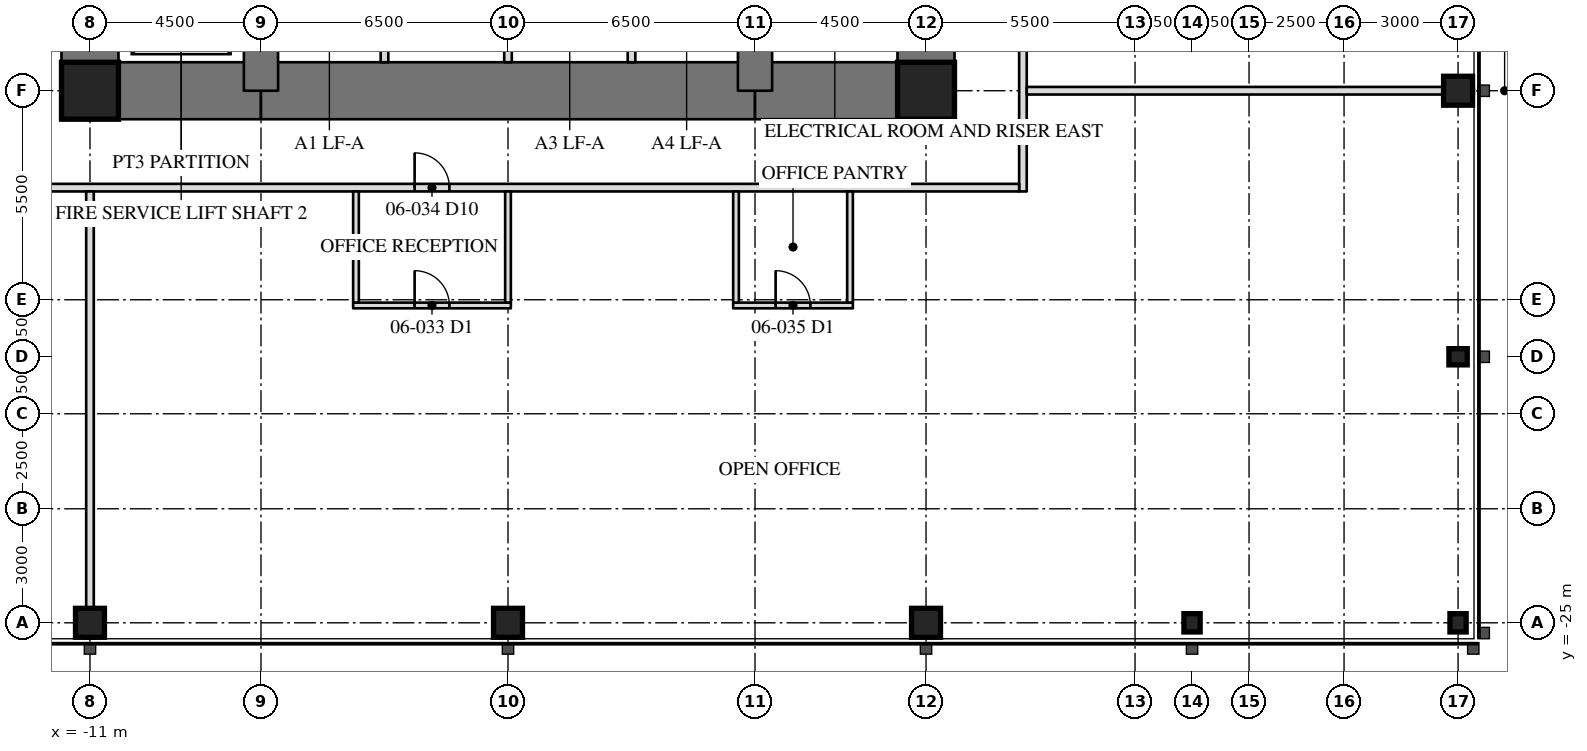
"""IFC4 building model, lengths in metres.
Left out: names, types, materials, properties, quantities, classifications, styles, units other than length and angle.
Written with IfcOpenShell. Run it as: python <this file> out.ifc"""

import sys

from ifc_helpers import new_model, si_unit, direction, frame, frame_2d, origin, origin_2d, place, context, subcontext, project, spatial, rectangle, hollow_rectangle, i_section, extrude, element, fill, save


model = new_model("IFC4")
c1 = context("Model", 3, precision=1e-05, world=origin(), true_north=direction((0.0, 1.0)))
c2 = subcontext(c1, "Body", "Model", "MODEL_VIEW")
j1 = project(units=[si_unit("LENGTHUNIT", "METRE"), si_unit("PLANEANGLEUNIT", "RADIAN")], contexts=[c1])
p1 = place(None, origin())
s1 = spatial("IfcSite", under=j1, at=p1, CompositionType="ELEMENT")
p2 = place(p1, origin())
s2 = spatial("IfcBuilding", under=s1, at=p2, CompositionType="ELEMENT")
p3 = place(p2, frame((0.0, 0.0, 28.3)))
s3 = spatial("IfcBuildingStorey", under=s2, at=p3, CompositionType="ELEMENT", Elevation=28.3)
for number, where, z_axis, x_axis in (
    (1, (-11.0, -25.0, 0.0), (0.0, 0.0, 1.0), (1.0, 0.0, 0.0)),
    (2, (0.0, -25.0, 0.0), (0.0, 0.0, 1.0), (1.0, 0.0, 0.0)),
    (3, (11.0, -25.0, 0.0), (0.0, 0.0, 1.0), (1.0, 0.0, 0.0)),
):
    element("IfcColumn", number, at=place(p3, frame(where, z_axis=z_axis, x_axis=x_axis)), inside=s3, PredefinedType="COLUMN", context=c2, shape_type="SweptSolid", body=[
        extrude(hollow_rectangle(XDim=0.762, YDim=0.762, WallThickness=0.127, at=origin_2d()), origin(), (0.0, 0.0, 1.0), 4.1),
    ])
for number, where, z_axis, x_axis in (
    (4, (18.0, -25.0, 0.0), (0.0, 0.0, 1.0), (1.0, 0.0, 0.0)),
    (5, (25.0, -25.0, 0.0), (0.0, 0.0, 1.0), (1.0, 0.0, 0.0)),
    (6, (25.0, -18.0, 0.0), (0.0, 0.0, 1.0), (0.0, 1.0, 0.0)),
):
    element("IfcColumn", number, at=place(p3, frame(where, z_axis=z_axis, x_axis=x_axis)), inside=s3, PredefinedType="COLUMN", context=c2, shape_type="SweptSolid", body=[
        extrude(i_section(OverallWidth=0.427, OverallDepth=0.483, WebThickness=0.051, FlangeThickness=0.082, at=origin_2d()), origin(), (0.0, 0.0, 1.0), 4.1),
    ])
p4 = place(p3, frame((25.0, -11.0, 0.0), z_axis=(0.0, 0.0, 1.0), x_axis=(0.0, 1.0, 0.0)))
e7 = element("IfcColumn", 7, at=p4, inside=s3, PredefinedType="COLUMN", context=c2, shape_type="SweptSolid", body=[
    extrude(hollow_rectangle(XDim=0.762, YDim=0.762, WallThickness=0.127, at=origin_2d()), origin(), (0.0, 0.0, 1.0), 4.1),
])
p5 = place(p3, frame((11.0, -11.0, 0.0), z_axis=(0.0, 0.0, 1.0), x_axis=(0.0, 1.0, 0.0)))
e8 = element("IfcWall", 8, at=p5, inside=s3, PredefinedType="SHEAR", context=c2, shape_type="SweptSolid", body=[
    extrude(rectangle(XDim=22.0, YDim=1.5, at=frame_2d((11.0, 0.0))), origin(), (0.0, 0.0, 1.0), 4.1),
])
p6 = place(p5, frame((15.393, 0.0, 0.0)))
e9 = element("IfcOpeningElement", 9, at=p6, cuts=e8, PredefinedType="OPENING", context=c2, shape_type="SweptSolid", body=[
    extrude(rectangle(XDim=0.915, YDim=2.134, at=frame_2d((0.458, 1.067))), frame((0.0, 0.76, 0.0), z_axis=(0.0, -1.0, 0.0), x_axis=(1.0, 0.0, 0.0)), (0.0, 0.0, 1.0), 1.52),
])
p7 = place(p3, frame((-11.0, 11.0, 0.0), z_axis=(0.0, 0.0, 1.0), x_axis=(0.0, -1.0, 0.0)))
e10 = element("IfcWall", 10, at=p7, inside=s3, PredefinedType="SHEAR", context=c2, shape_type="SweptSolid", body=[
    extrude(rectangle(XDim=22.0, YDim=1.5, at=frame_2d((11.0, 0.0))), origin(), (0.0, 0.0, 1.0), 4.1),
])
p8 = place(p7, frame((15.393, 0.0, 0.0)))
e11 = element("IfcOpeningElement", 11, at=p8, cuts=e10, PredefinedType="OPENING", context=c2, shape_type="SweptSolid", body=[
    extrude(rectangle(XDim=0.915, YDim=2.134, at=frame_2d((0.458, 1.067))), frame((0.0, 0.76, 0.0), z_axis=(0.0, -1.0, 0.0), x_axis=(1.0, 0.0, 0.0)), (0.0, 0.0, 1.0), 1.52),
])
p9 = place(p3, frame((-11.0, -11.0, 0.0), z_axis=(0.0, 0.0, 1.0), x_axis=(1.0, 0.0, 0.0)))
e12 = element("IfcWall", 12, at=p9, inside=s3, PredefinedType="SHEAR", context=c2, shape_type="SweptSolid", body=[
    extrude(rectangle(XDim=4.5, YDim=1.5, at=frame_2d((2.25, 0.0))), origin(), (0.0, 0.0, 1.0), 4.1),
])
p10 = place(p3, frame((-6.5, -11.0, 0.0), z_axis=(0.0, 0.0, 1.0), x_axis=(1.0, 0.0, 0.0)))
e13 = element("IfcWall", 13, at=p10, inside=s3, PredefinedType="SHEAR", context=c2, shape_type="SweptSolid", body=[
    extrude(rectangle(XDim=13.0, YDim=1.5, at=frame_2d((6.5, 0.0))), origin(), (0.0, 0.0, 1.0), 4.1),
])
p11 = place(p3, frame((6.5, -11.0, 0.0), z_axis=(0.0, 0.0, 1.0), x_axis=(1.0, 0.0, 0.0)))
e14 = element("IfcWall", 14, at=p11, inside=s3, PredefinedType="SHEAR", context=c2, shape_type="SweptSolid", body=[
    extrude(rectangle(XDim=4.5, YDim=1.5, at=frame_2d((2.25, 0.0))), origin(), (0.0, 0.0, 1.0), 4.1),
])
for number, where, z_axis, x_axis in (
    (15, (6.5, -11.0, 0.0), (0.0, 0.0, 1.0), (0.0, 1.0, 0.0)),
    (16, (-6.5, -6.5, 0.0), (0.0, 0.0, 1.0), (0.0, -1.0, 0.0)),
):
    element("IfcWall", number, at=place(p3, frame(where, z_axis=z_axis, x_axis=x_axis)), inside=s3, PredefinedType="SHEAR", context=c2, shape_type="SweptSolid", body=[
        extrude(rectangle(XDim=4.5, YDim=0.9, at=frame_2d((2.25, 0.0))), origin(), (0.0, 0.0, 1.0), 4.1),
    ])
for number, where, z_axis, x_axis in (
    (17, (-11.0, -11.0, 0.0), (0.0, 0.0, 1.0), (1.0, 0.0, 0.0)),
    (18, (11.0, -11.0, 0.0), (0.0, 0.0, 1.0), (1.0, 0.0, 0.0)),
):
    element("IfcColumn", number, at=place(p3, frame(where, z_axis=z_axis, x_axis=x_axis)), inside=s3, PredefinedType="COLUMN", context=c2, shape_type="SweptSolid", body=[
        extrude(hollow_rectangle(XDim=1.499, YDim=1.499, WallThickness=0.102, at=origin_2d()), origin(), (0.0, 0.0, 1.0), 4.1),
    ])
for number, where, z_axis, x_axis in (
    (19, (-3.25, -10.25, 0.0), (0.0, 0.0, 1.0), (0.0, 1.0, 0.0)),
    (20, (0.0, -10.25, 0.0), (0.0, 0.0, 1.0), (0.0, 1.0, 0.0)),
    (21, (3.25, -10.25, 0.0), (0.0, 0.0, 1.0), (0.0, 1.0, 0.0)),
):
    element("IfcWall", number, at=place(p3, frame(where, z_axis=z_axis, x_axis=x_axis)), inside=s3, PredefinedType="PARTITIONING", context=c2, shape_type="SweptSolid", body=[
        extrude(rectangle(XDim=3.3, YDim=0.2, at=frame_2d((1.65, 0.0))), origin(), (0.0, 0.0, 1.0), 3.91),
    ])
p12 = place(p3, frame((13.55, -13.65, 0.0), z_axis=(0.0, 0.0, 1.0), x_axis=(0.0, 1.0, 0.0)))
e22 = element("IfcWall", 22, at=p12, inside=s3, PredefinedType="PARTITIONING", context=c2, shape_type="SweptSolid", body=[
    extrude(rectangle(XDim=27.1, YDim=0.2, at=frame_2d((13.55, 0.0))), origin(), (0.0, 0.0, 1.0), 3.91),
])
p13 = place(p12, frame((7.192, 0.0, 0.0)))
e23 = element("IfcOpeningElement", 23, at=p13, cuts=e22, PredefinedType="OPENING", context=c2, shape_type="SweptSolid", body=[
    extrude(rectangle(XDim=0.915, YDim=2.134, at=frame_2d((0.458, 1.067))), frame((0.0, 0.11, 0.0), z_axis=(0.0, -1.0, 0.0), x_axis=(1.0, 0.0, 0.0)), (0.0, 0.0, 1.0), 0.22),
])
p14 = place(p3, frame((-13.65, -13.55, 0.0), z_axis=(0.0, 0.0, 1.0), x_axis=(1.0, 0.0, 0.0)))
e24 = element("IfcWall", 24, at=p14, inside=s3, PredefinedType="PARTITIONING", context=c2, shape_type="SweptSolid", body=[
    extrude(rectangle(XDim=27.1, YDim=0.2, at=frame_2d((13.55, 0.0))), origin(), (0.0, 0.0, 1.0), 3.91),
])
p15 = place(p14, frame((11.192, 0.0, 0.0)))
e25 = element("IfcOpeningElement", 25, at=p15, cuts=e24, PredefinedType="OPENING", context=c2, shape_type="SweptSolid", body=[
    extrude(rectangle(XDim=0.915, YDim=2.134, at=frame_2d((0.458, 1.067))), frame((0.0, 0.11, 0.0), z_axis=(0.0, -1.0, 0.0), x_axis=(1.0, 0.0, 0.0)), (0.0, 0.0, 1.0), 0.22),
])
for number, where, z_axis, x_axis in (
    (26, (-11.0, -13.65, 0.0), (0.0, 0.0, 1.0), (0.0, -1.0, 0.0)),
    (27, (13.65, -11.0, 0.0), (0.0, 0.0, 1.0), (1.0, 0.0, 0.0)),
):
    element("IfcWall", number, at=place(p3, frame(where, z_axis=z_axis, x_axis=x_axis)), inside=s3, PredefinedType="PARTITIONING", context=c2, shape_type="SweptSolid", body=[
        extrude(rectangle(XDim=11.765, YDim=0.2, at=frame_2d((5.883, 0.0))), origin(), (0.0, 0.0, 1.0), 3.13),
    ])
p16 = place(p3, frame((-4.075, -16.65, 0.0), z_axis=(0.0, 0.0, 1.0), x_axis=(1.0, 0.0, 0.0)))
e28 = element("IfcWall", 28, at=p16, inside=s3, PredefinedType="PARTITIONING", context=c2, shape_type="SweptSolid", body=[
    extrude(rectangle(XDim=4.15, YDim=0.15, at=frame_2d((2.075, 0.0))), origin(), (0.0, 0.0, 1.0), 3.91),
])
p17 = place(p16, frame((1.617, 0.0, 0.0)))
e29 = element("IfcOpeningElement", 29, at=p17, cuts=e28, PredefinedType="OPENING", context=c2, shape_type="SweptSolid", body=[
    extrude(rectangle(XDim=0.915, YDim=2.134, at=frame_2d((0.458, 1.067))), frame((0.0, 0.085, 0.0), z_axis=(0.0, -1.0, 0.0), x_axis=(1.0, 0.0, 0.0)), (0.0, 0.0, 1.0), 0.17),
])
p18 = place(p3, frame((-4.0, -16.575, 0.0), z_axis=(0.0, 0.0, 1.0), x_axis=(0.0, 1.0, 0.0)))
e30 = element("IfcWall", 30, at=p18, inside=s3, PredefinedType="PARTITIONING", context=c2, shape_type="SweptSolid", body=[
    extrude(rectangle(XDim=2.925, YDim=0.15, at=frame_2d((1.462, 0.0))), origin(), (0.0, 0.0, 1.0), 3.91),
])
p19 = place(p3, frame((0.0, -16.575, 0.0), z_axis=(0.0, 0.0, 1.0), x_axis=(0.0, 1.0, 0.0)))
e31 = element("IfcWall", 31, at=p19, inside=s3, PredefinedType="PARTITIONING", context=c2, shape_type="SweptSolid", body=[
    extrude(rectangle(XDim=2.925, YDim=0.15, at=frame_2d((1.462, 0.0))), origin(), (0.0, 0.0, 1.0), 3.13),
])
p20 = place(p3, frame((5.925, -16.65, 0.0), z_axis=(0.0, 0.0, 1.0), x_axis=(1.0, 0.0, 0.0)))
e32 = element("IfcWall", 32, at=p20, inside=s3, PredefinedType="PARTITIONING", context=c2, shape_type="SweptSolid", body=[
    extrude(rectangle(XDim=3.15, YDim=0.15, at=frame_2d((1.575, 0.0))), origin(), (0.0, 0.0, 1.0), 3.91),
])
p21 = place(p20, frame((1.117, 0.0, 0.0)))
e33 = element("IfcOpeningElement", 33, at=p21, cuts=e32, PredefinedType="OPENING", context=c2, shape_type="SweptSolid", body=[
    extrude(rectangle(XDim=0.915, YDim=2.134, at=frame_2d((0.458, 1.067))), frame((0.0, 0.085, 0.0), z_axis=(0.0, -1.0, 0.0), x_axis=(1.0, 0.0, 0.0)), (0.0, 0.0, 1.0), 0.17),
])
for number, where, z_axis, x_axis in (
    (34, (6.0, -16.575, 0.0), (0.0, 0.0, 1.0), (0.0, 1.0, 0.0)),
    (35, (9.0, -16.575, 0.0), (0.0, 0.0, 1.0), (0.0, 1.0, 0.0)),
):
    element("IfcWall", number, at=place(p3, frame(where, z_axis=z_axis, x_axis=x_axis)), inside=s3, PredefinedType="PARTITIONING", context=c2, shape_type="SweptSolid", body=[
        extrude(rectangle(XDim=2.925, YDim=0.15, at=frame_2d((1.462, 0.0))), origin(), (0.0, 0.0, 1.0), 3.91),
    ])
p22 = place(p17, origin())
e36 = element("IfcDoor", 36, at=p22, inside=s3, OperationType="SINGLE_SWING_LEFT", PredefinedType="DOOR", context=c2, shape_type="SweptSolid", body=[
    extrude(rectangle(XDim=0.915, YDim=2.134, at=frame_2d((0.458, 1.067))), frame((0.0, 0.025, 0.0), z_axis=(0.0, -1.0, 0.0), x_axis=(1.0, 0.0, 0.0)), (0.0, 0.0, 1.0), 0.05),
])
fill(e29, e36)
p23 = place(p15, origin())
e37 = element("IfcDoor", 37, at=p23, inside=s3, OperationType="SINGLE_SWING_LEFT", PredefinedType="DOOR", context=c2, shape_type="SweptSolid", body=[
    extrude(rectangle(XDim=0.915, YDim=2.134, at=frame_2d((0.458, 1.067))), frame((0.0, 0.025, 0.0), z_axis=(0.0, -1.0, 0.0), x_axis=(1.0, 0.0, 0.0)), (0.0, 0.0, 1.0), 0.05),
])
fill(e25, e37)
p24 = place(p21, origin())
e38 = element("IfcDoor", 38, at=p24, inside=s3, OperationType="SINGLE_SWING_LEFT", PredefinedType="DOOR", context=c2, shape_type="SweptSolid", body=[
    extrude(rectangle(XDim=0.915, YDim=2.134, at=frame_2d((0.458, 1.067))), frame((0.0, 0.025, 0.0), z_axis=(0.0, -1.0, 0.0), x_axis=(1.0, 0.0, 0.0)), (0.0, 0.0, 1.0), 0.05),
])
fill(e33, e38)
save(model, sys.argv[1])
